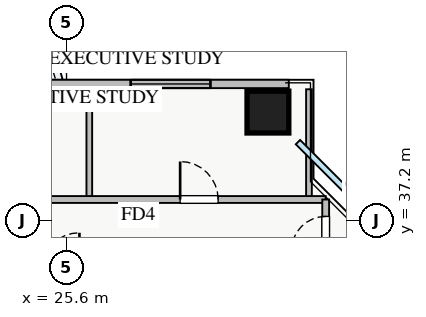
"""IFC4 building model, lengths in metres.
Left out: names, types, materials, properties, quantities, classifications, styles, units other than length and angle.
Written with IfcOpenShell. Run it as: python <this file> out.ifc"""

import sys

from ifc_helpers import new_model, si_unit, direction, frame, frame_2d, origin, origin_2d, place, context, subcontext, project, spatial, rectangle, extrude, source, transform, mapped, element, fill, save


model = new_model("IFC4")
c1 = context("Model", 3, precision=1e-05, world=origin(), true_north=direction((0.0, 1.0)))
c2 = subcontext(c1, "Body", "Model", "MODEL_VIEW")
j1 = project(units=[si_unit("LENGTHUNIT", "METRE"), si_unit("PLANEANGLEUNIT", "RADIAN")], contexts=[c1])
p1 = place(None, origin())
s1 = spatial("IfcSite", under=j1, at=p1, CompositionType="ELEMENT")
p2 = place(p1, origin())
s2 = spatial("IfcBuilding", under=s1, at=p2, CompositionType="ELEMENT")
p3 = place(p2, frame((0.0, 0.0, 113.25)))
s3 = spatial("IfcBuildingStorey", under=s2, at=p3, CompositionType="ELEMENT", Elevation=113.25)
m1 = source(origin(), c2, "Body", "SweptSolid", [
    extrude(rectangle(XDim=1.1, YDim=1.1, at=origin_2d()), origin(), (0.0, 0.0, 1.0), 3.25),
])
p4 = place(p3, frame((30.9, 40.05, 0.0), z_axis=(0.0, 0.0, 1.0), x_axis=(1.0, 0.0, 0.0)))
e1 = element("IfcColumn", 1, at=p4, inside=s3, PredefinedType="COLUMN", context=c2, shape_type="MappedRepresentation", body=[
    mapped(m1, transform((0.0, 0.0, 0.0), x_axis=(1.0, 0.0, 0.0), y_axis=(0.0, 1.0, 0.0), z_axis=(0.0, 0.0, 1.0), scale=1.0)),
])
p5 = place(p3, frame((6.55, 40.79, 0.0), z_axis=(0.0, 0.0, 1.0), x_axis=(1.0, 0.0, 0.0)))
e2 = element("IfcWall", 2, at=p5, inside=s3, PredefinedType="STANDARD", context=c2, shape_type="SweptSolid", body=[
    extrude(rectangle(XDim=24.9, YDim=0.22, at=frame_2d((12.45, 0.0))), origin(), (0.0, 0.0, 1.0), 2.61),
])
p6 = place(p5, frame((13.3, 0.0, 0.0)))
e3 = element("IfcOpeningElement", 3, at=p6, cuts=e2, PredefinedType="OPENING", context=c2, shape_type="SweptSolid", body=[
    extrude(rectangle(XDim=1.2, YDim=2.1, at=frame_2d((0.6, 1.05))), frame((0.0, 0.12, 0.0), z_axis=(0.0, -1.0, 0.0), x_axis=(1.0, 0.0, 0.0)), (0.0, 0.0, 1.0), 0.24),
])
p7 = place(p5, frame((3.635, 0.0, 0.9)))
e4 = element("IfcOpeningElement", 4, at=p7, cuts=e2, PredefinedType="OPENING", context=c2, shape_type="SweptSolid", body=[
    extrude(rectangle(XDim=2.4, YDim=1.5, at=frame_2d((1.2, 0.75))), frame((0.0, 0.12, 0.0), z_axis=(0.0, -1.0, 0.0), x_axis=(1.0, 0.0, 0.0)), (0.0, 0.0, 1.0), 0.24),
])
p8 = place(p5, frame((8.438, 0.0, 0.9)))
e5 = element("IfcOpeningElement", 5, at=p8, cuts=e2, PredefinedType="OPENING", context=c2, shape_type="SweptSolid", body=[
    extrude(rectangle(XDim=1.8, YDim=1.45, at=frame_2d((0.9, 0.725))), frame((0.0, 0.12, 0.0), z_axis=(0.0, -1.0, 0.0), x_axis=(1.0, 0.0, 0.0)), (0.0, 0.0, 1.0), 0.24),
])
p9 = place(p5, frame((14.813, 0.0, 0.9)))
e6 = element("IfcOpeningElement", 6, at=p9, cuts=e2, PredefinedType="OPENING", context=c2, shape_type="SweptSolid", body=[
    extrude(rectangle(XDim=1.5, YDim=1.45, at=frame_2d((0.75, 0.725))), frame((0.0, 0.12, 0.0), z_axis=(0.0, -1.0, 0.0), x_axis=(1.0, 0.0, 0.0)), (0.0, 0.0, 1.0), 0.24),
])
p10 = place(p5, frame((20.738, 0.0, 0.9)))
e7 = element("IfcOpeningElement", 7, at=p10, cuts=e2, PredefinedType="OPENING", context=c2, shape_type="SweptSolid", body=[
    extrude(rectangle(XDim=2.1, YDim=1.48, at=frame_2d((1.05, 0.74))), frame((0.0, 0.12, 0.0), z_axis=(0.0, -1.0, 0.0), x_axis=(1.0, 0.0, 0.0)), (0.0, 0.0, 1.0), 0.24),
])
p11 = place(p5, frame((0.258, 0.0, 0.9)))
e8 = element("IfcOpeningElement", 8, at=p11, cuts=e2, PredefinedType="OPENING", context=c2, shape_type="SweptSolid", body=[
    extrude(rectangle(XDim=1.8, YDim=1.5, at=frame_2d((0.9, 0.75))), frame((0.0, 0.12, 0.0), z_axis=(0.0, -1.0, 0.0), x_axis=(1.0, 0.0, 0.0)), (0.0, 0.0, 1.0), 0.24),
])
for number, where, z_axis, x_axis in (
    (9, (26.2, 37.75, 0.0), (0.0, 0.0, 1.0), (0.0, 1.0, 0.0)),
    (10, (31.98, 37.75, 0.0), (0.0, 0.0, 1.0), (0.0, 1.0, 0.0)),
):
    element("IfcWall", number, at=place(p3, frame(where, z_axis=z_axis, x_axis=x_axis)), inside=s3, PredefinedType="PARTITIONING", context=c2, shape_type="SweptSolid", body=[
        extrude(rectangle(XDim=2.9, YDim=0.15, at=frame_2d((1.45, 0.0))), origin(), (0.0, 0.0, 1.0), 3.07),
    ])
p12 = place(p3, frame((8.85, 37.75, 0.0), z_axis=(0.0, 0.0, 1.0), x_axis=(1.0, 0.0, 0.0)))
e11 = element("IfcWall", 11, at=p12, inside=s3, PredefinedType="PARTITIONING", context=c2, shape_type="SweptSolid", body=[
    extrude(rectangle(XDim=23.57, YDim=0.18, at=frame_2d((11.785, 0.0))), origin(), (0.0, 0.0, 1.0), 3.07),
])
p13 = place(p12, frame((2.035, 0.0, 0.0)))
e12 = element("IfcOpeningElement", 12, at=p13, cuts=e11, PredefinedType="OPENING", context=c2, shape_type="SweptSolid", body=[
    extrude(rectangle(XDim=1.0, YDim=2.05, at=frame_2d((0.5, 1.025))), frame((0.0, 0.1, 0.0), z_axis=(0.0, -1.0, 0.0), x_axis=(1.0, 0.0, 0.0)), (0.0, 0.0, 1.0), 0.2),
])
p14 = place(p12, frame((7.16, 0.0, 0.0)))
e13 = element("IfcOpeningElement", 13, at=p14, cuts=e11, PredefinedType="OPENING", context=c2, shape_type="SweptSolid", body=[
    extrude(rectangle(XDim=1.0, YDim=2.05, at=frame_2d((0.5, 1.025))), frame((0.0, 0.1, 0.0), z_axis=(0.0, -1.0, 0.0), x_axis=(1.0, 0.0, 0.0)), (0.0, 0.0, 1.0), 0.2),
])
p15 = place(p12, frame((13.3, 0.0, 0.0)))
e14 = element("IfcOpeningElement", 14, at=p15, cuts=e11, PredefinedType="OPENING", context=c2, shape_type="SweptSolid", body=[
    extrude(rectangle(XDim=1.0, YDim=2.05, at=frame_2d((0.5, 1.025))), frame((0.0, 0.1, 0.0), z_axis=(0.0, -1.0, 0.0), x_axis=(1.0, 0.0, 0.0)), (0.0, 0.0, 1.0), 0.2),
])
p16 = place(p12, frame((19.74, 0.0, 0.0)))
e15 = element("IfcOpeningElement", 15, at=p16, cuts=e11, PredefinedType="OPENING", context=c2, shape_type="SweptSolid", body=[
    extrude(rectangle(XDim=1.0, YDim=2.05, at=frame_2d((0.5, 1.025))), frame((0.0, 0.1, 0.0), z_axis=(0.0, -1.0, 0.0), x_axis=(1.0, 0.0, 0.0)), (0.0, 0.0, 1.0), 0.2),
])
p17 = place(p3, frame((32.42, 8.25, 0.0), z_axis=(0.0, 0.0, 1.0), x_axis=(0.0, 1.0, 0.0)))
e16 = element("IfcWall", 16, at=p17, inside=s3, PredefinedType="PARTITIONING", context=c2, shape_type="SweptSolid", body=[
    extrude(rectangle(XDim=29.5, YDim=0.18, at=frame_2d((14.75, 0.0))), origin(), (0.0, 0.0, 1.0), 3.07),
])
p18 = place(p17, frame((28.155, 0.0, 0.0)))
e17 = element("IfcOpeningElement", 17, at=p18, cuts=e16, PredefinedType="OPENING", context=c2, shape_type="SweptSolid", body=[
    extrude(rectangle(XDim=0.9, YDim=2.05, at=frame_2d((0.45, 1.025))), frame((0.0, 0.1, 0.0), z_axis=(0.0, -1.0, 0.0), x_axis=(1.0, 0.0, 0.0)), (0.0, 0.0, 1.0), 0.2),
])
p19 = place(p17, frame((0.445, 0.0, 0.0)))
e18 = element("IfcOpeningElement", 18, at=p19, cuts=e16, PredefinedType="OPENING", context=c2, shape_type="SweptSolid", body=[
    extrude(rectangle(XDim=0.9, YDim=2.05, at=frame_2d((0.45, 1.025))), frame((0.0, 0.1, 0.0), z_axis=(0.0, -1.0, 0.0), x_axis=(1.0, 0.0, 0.0)), (0.0, 0.0, 1.0), 0.2),
])
p20 = place(p17, frame((4.76, 0.0, 0.0)))
e19 = element("IfcOpeningElement", 19, at=p20, cuts=e16, PredefinedType="OPENING", context=c2, shape_type="SweptSolid", body=[
    extrude(rectangle(XDim=1.0, YDim=2.05, at=frame_2d((0.5, 1.025))), frame((0.0, 0.1, 0.0), z_axis=(0.0, -1.0, 0.0), x_axis=(1.0, 0.0, 0.0)), (0.0, 0.0, 1.0), 0.2),
])
p21 = place(p17, frame((18.04, 0.0, 0.0)))
e20 = element("IfcOpeningElement", 20, at=p21, cuts=e16, PredefinedType="OPENING", context=c2, shape_type="SweptSolid", body=[
    extrude(rectangle(XDim=1.0, YDim=2.05, at=frame_2d((0.5, 1.025))), frame((0.0, 0.1, 0.0), z_axis=(0.0, -1.0, 0.0), x_axis=(1.0, 0.0, 0.0)), (0.0, 0.0, 1.0), 0.2),
])
m2 = source(origin(), c2, "Body", "SweptSolid", [
    extrude(rectangle(XDim=2.1, YDim=1.48, at=frame_2d((1.05, 0.74))), frame((0.0, 0.03, 0.0), z_axis=(0.0, -1.0, 0.0), x_axis=(1.0, 0.0, 0.0)), (0.0, 0.0, 1.0), 0.06),
])
p22 = place(p10, origin())
e21 = element("IfcWindow", 21, at=p22, inside=s3, PartitioningType="TRIPLE_PANEL_VERTICAL", PredefinedType="WINDOW", context=c2, shape_type="MappedRepresentation", body=[
    mapped(m2, transform((0.0, 0.0, 0.0), x_axis=(1.0, 0.0, 0.0), y_axis=(0.0, 1.0, 0.0), z_axis=(0.0, 0.0, 1.0), scale=1.0)),
])
fill(e7, e21)
m3 = source(origin(), c2, "Body", "SweptSolid", [
    extrude(rectangle(XDim=1.0, YDim=2.05, at=frame_2d((0.5, 1.025))), frame((0.0, 0.025, 0.0), z_axis=(0.0, -1.0, 0.0), x_axis=(1.0, 0.0, 0.0)), (0.0, 0.0, 1.0), 0.05),
])
p23 = place(p16, origin())
e22 = element("IfcDoor", 22, at=p23, inside=s3, OperationType="SINGLE_SWING_LEFT", PredefinedType="DOOR", context=c2, shape_type="MappedRepresentation", body=[
    mapped(m3, transform((0.0, 0.0, 0.0), x_axis=(1.0, 0.0, 0.0), y_axis=(0.0, 1.0, 0.0), z_axis=(0.0, 0.0, 1.0), scale=1.0)),
])
fill(e15, e22)
m4 = source(origin(), c2, "Body", "SweptSolid", [
    extrude(rectangle(XDim=0.9, YDim=2.05, at=frame_2d((0.45, 1.025))), frame((0.0, 0.025, 0.0), z_axis=(0.0, -1.0, 0.0), x_axis=(1.0, 0.0, 0.0)), (0.0, 0.0, 1.0), 0.05),
])
p24 = place(p18, origin())
e23 = element("IfcDoor", 23, at=p24, inside=s3, OperationType="SINGLE_SWING_LEFT", PredefinedType="DOOR", context=c2, shape_type="MappedRepresentation", body=[
    mapped(m4, transform((0.0, 0.0, 0.0), x_axis=(1.0, 0.0, 0.0), y_axis=(0.0, 1.0, 0.0), z_axis=(0.0, 0.0, 1.0), scale=1.0)),
])
fill(e17, e23)
save(model, sys.argv[1])
